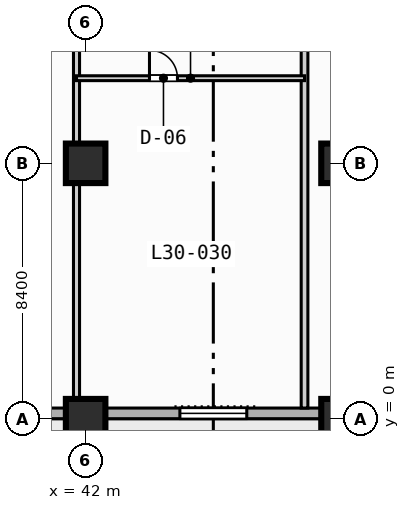
"""IFC4 building model, lengths in metres.
Left out: names, types, materials, properties, quantities, classifications, styles, units other than length and angle.
Written with IfcOpenShell. Run it as: python <this file> out.ifc"""

import sys

from ifc_helpers import new_model, si_unit, direction, frame, frame_2d, origin, origin_2d, place, context, subcontext, project, spatial, rectangle, extrude, element, fill, save


model = new_model("IFC4")
c1 = context("Model", 3, precision=1e-05, world=origin(), true_north=direction((0.0, 1.0)))
c2 = subcontext(c1, "Body", "Model", "MODEL_VIEW")
j1 = project(units=[si_unit("LENGTHUNIT", "METRE"), si_unit("PLANEANGLEUNIT", "RADIAN")], contexts=[c1])
p1 = place(None, origin())
s1 = spatial("IfcSite", under=j1, at=p1, CompositionType="ELEMENT")
p2 = place(p1, origin())
s2 = spatial("IfcBuilding", under=s1, at=p2, CompositionType="ELEMENT")
p3 = place(p2, frame((0.0, 0.0, 126.6)))
s3 = spatial("IfcBuildingStorey", under=s2, at=p3, CompositionType="ELEMENT", Elevation=126.6)
for number, where, z_axis, x_axis in (
    (1, (42.0, 0.0, 0.0), (0.0, 0.0, 1.0), (1.0, 0.0, 0.0)),
    (2, (42.0, 8.4, 0.0), (0.0, 0.0, 1.0), (1.0, 0.0, 0.0)),
    (3, (50.4, 0.0, 0.0), (0.0, 0.0, 1.0), (1.0, 0.0, 0.0)),
    (4, (50.4, 8.4, 0.0), (0.0, 0.0, 1.0), (1.0, 0.0, 0.0)),
):
    element("IfcColumn", number, at=place(p3, frame(where, z_axis=z_axis, x_axis=x_axis)), inside=s3, PredefinedType="COLUMN", context=c2, shape_type="SweptSolid", body=[
        extrude(rectangle(XDim=1.3, YDim=1.3, at=origin_2d()), origin(), (0.0, 0.0, 1.0), 3.8),
    ])
p4 = place(p3, frame((72.425, 0.175, 0.0), z_axis=(0.0, 0.0, 1.0), x_axis=(-1.0, 0.0, 0.0)))
e5 = element("IfcWall", 5, at=p4, inside=s3, PredefinedType="STANDARD", context=c2, shape_type="SweptSolid", body=[
    extrude(rectangle(XDim=69.25, YDim=0.35, at=frame_2d((34.625, 0.0))), origin(), (0.0, 0.0, 1.0), 3.55),
])
p5 = place(p4, frame((50.725, 0.0, 0.0)))
e6 = element("IfcOpeningElement", 6, at=p5, cuts=e5, PredefinedType="OPENING", context=c2, shape_type="SweptSolid", body=[
    extrude(rectangle(XDim=1.4, YDim=2.2, at=frame_2d((0.7, 1.1))), frame((0.0, 0.185, 0.0), z_axis=(0.0, -1.0, 0.0), x_axis=(1.0, 0.0, 0.0)), (0.0, 0.0, 1.0), 0.37),
])
p6 = place(p4, frame((58.725, 0.0, 0.85)))
e7 = element("IfcOpeningElement", 7, at=p6, cuts=e5, PredefinedType="OPENING", context=c2, shape_type="SweptSolid", body=[
    extrude(rectangle(XDim=2.2, YDim=1.8, at=frame_2d((1.1, 0.9))), frame((0.0, 0.185, 0.0), z_axis=(0.0, -1.0, 0.0), x_axis=(1.0, 0.0, 0.0)), (0.0, 0.0, 1.0), 0.37),
])
p7 = place(p4, frame((41.925, 0.0, 0.85)))
e8 = element("IfcOpeningElement", 8, at=p7, cuts=e5, PredefinedType="OPENING", context=c2, shape_type="SweptSolid", body=[
    extrude(rectangle(XDim=2.2, YDim=1.8, at=frame_2d((1.1, 0.9))), frame((0.0, 0.185, 0.0), z_axis=(0.0, -1.0, 0.0), x_axis=(1.0, 0.0, 0.0)), (0.0, 0.0, 1.0), 0.37),
])
p8 = place(p4, frame((33.525, 0.0, 0.85)))
e9 = element("IfcOpeningElement", 9, at=p8, cuts=e5, PredefinedType="OPENING", context=c2, shape_type="SweptSolid", body=[
    extrude(rectangle(XDim=2.2, YDim=1.8, at=frame_2d((1.1, 0.9))), frame((0.0, 0.185, 0.0), z_axis=(0.0, -1.0, 0.0), x_axis=(1.0, 0.0, 0.0)), (0.0, 0.0, 1.0), 0.37),
])
p9 = place(p4, frame((25.125, 0.0, 0.85)))
e10 = element("IfcOpeningElement", 10, at=p9, cuts=e5, PredefinedType="OPENING", context=c2, shape_type="SweptSolid", body=[
    extrude(rectangle(XDim=2.2, YDim=1.8, at=frame_2d((1.1, 0.9))), frame((0.0, 0.185, 0.0), z_axis=(0.0, -1.0, 0.0), x_axis=(1.0, 0.0, 0.0)), (0.0, 0.0, 1.0), 0.37),
])
p10 = place(p4, frame((64.825, 0.0, 0.85)))
e11 = element("IfcOpeningElement", 11, at=p10, cuts=e5, PredefinedType="OPENING", context=c2, shape_type="SweptSolid", body=[
    extrude(rectangle(XDim=1.8, YDim=1.8, at=frame_2d((0.9, 0.9))), frame((0.0, 0.185, 0.0), z_axis=(0.0, -1.0, 0.0), x_axis=(1.0, 0.0, 0.0)), (0.0, 0.0, 1.0), 0.37),
])
p11 = place(p4, frame((48.025, 0.0, 0.85)))
e12 = element("IfcOpeningElement", 12, at=p11, cuts=e5, PredefinedType="OPENING", context=c2, shape_type="SweptSolid", body=[
    extrude(rectangle(XDim=1.8, YDim=1.8, at=frame_2d((0.9, 0.9))), frame((0.0, 0.185, 0.0), z_axis=(0.0, -1.0, 0.0), x_axis=(1.0, 0.0, 0.0)), (0.0, 0.0, 1.0), 0.37),
])
p12 = place(p3, frame((41.7, 0.35, 0.0), z_axis=(0.0, 0.0, 1.0), x_axis=(0.0, 1.0, 0.0)))
e13 = element("IfcWall", 13, at=p12, inside=s3, PredefinedType="PARTITIONING", context=c2, shape_type="SweptSolid", body=[
    extrude(rectangle(XDim=16.25, YDim=0.2, at=frame_2d((8.125, 0.0))), origin(), (0.0, 0.0, 1.0), 2.8),
])
p13 = place(p12, frame((14.2, 0.0, 0.0)))
e14 = element("IfcOpeningElement", 14, at=p13, cuts=e13, PredefinedType="OPENING", context=c2, shape_type="SweptSolid", body=[
    extrude(rectangle(XDim=0.92, YDim=2.1, at=frame_2d((0.46, 1.05))), frame((0.0, 0.11, 0.0), z_axis=(0.0, -1.0, 0.0), x_axis=(1.0, 0.0, 0.0)), (0.0, 0.0, 1.0), 0.22),
])
p14 = place(p3, frame((49.2, 0.35, 0.0), z_axis=(0.0, 0.0, 1.0), x_axis=(0.0, 1.0, 0.0)))
e15 = element("IfcWall", 15, at=p14, inside=s3, PredefinedType="PARTITIONING", context=c2, shape_type="SweptSolid", body=[
    extrude(rectangle(XDim=16.25, YDim=0.22, at=frame_2d((8.125, 0.0))), origin(), (0.0, 0.0, 1.0), 3.55),
])
p15 = place(p3, frame((41.7, 11.2, 0.0), z_axis=(0.0, 0.0, 1.0), x_axis=(1.0, 0.0, 0.0)))
e16 = element("IfcWall", 16, at=p15, inside=s3, PredefinedType="PARTITIONING", context=c2, shape_type="SweptSolid", body=[
    extrude(rectangle(XDim=7.5, YDim=0.16, at=frame_2d((3.75, 0.0))), origin(), (0.0, 0.0, 1.0), 3.55),
])
p16 = place(p15, frame((2.4, 0.0, 0.0)))
e17 = element("IfcOpeningElement", 17, at=p16, cuts=e16, PredefinedType="OPENING", context=c2, shape_type="SweptSolid", body=[
    extrude(rectangle(XDim=0.92, YDim=2.1, at=frame_2d((0.46, 1.05))), frame((0.0, 0.09, 0.0), z_axis=(0.0, -1.0, 0.0), x_axis=(1.0, 0.0, 0.0)), (0.0, 0.0, 1.0), 0.18),
])
p17 = place(p9, origin())
e18 = element("IfcWindow", 18, at=p17, inside=s3, PartitioningType="SINGLE_PANEL", PredefinedType="WINDOW", context=c2, shape_type="SweptSolid", body=[
    extrude(rectangle(XDim=2.2, YDim=1.8, at=frame_2d((1.1, 0.9))), frame((0.0, 0.03, 0.0), z_axis=(0.0, -1.0, 0.0), x_axis=(1.0, 0.0, 0.0)), (0.0, 0.0, 1.0), 0.06),
])
fill(e10, e18)
p18 = place(p16, origin())
e19 = element("IfcDoor", 19, at=p18, inside=s3, OperationType="SINGLE_SWING_LEFT", PredefinedType="DOOR", context=c2, shape_type="SweptSolid", body=[
    extrude(rectangle(XDim=0.92, YDim=2.1, at=frame_2d((0.46, 1.05))), frame((0.0, 0.025, 0.0), z_axis=(0.0, -1.0, 0.0), x_axis=(1.0, 0.0, 0.0)), (0.0, 0.0, 1.0), 0.05),
])
fill(e17, e19)
save(model, sys.argv[1])
